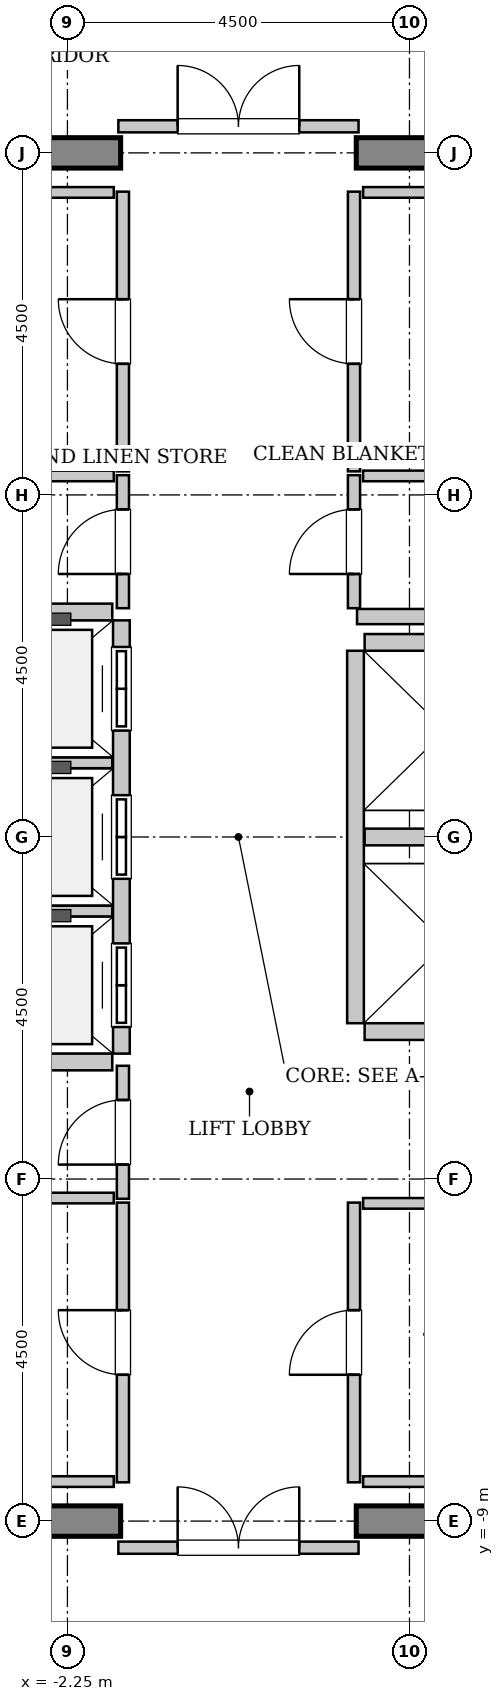
"""IFC4 building model, lengths in metres.
Left out: names, types, materials, properties, quantities, classifications, styles, units other than length and angle.
Written with IfcOpenShell. Run it as: python <this file> out.ifc"""

import sys

from ifc_helpers import new_model, si_unit, direction, frame, frame_2d, origin, place, context, subcontext, project, spatial, rectangle, extrude, source, transform, mapped, element, fill, save


model = new_model("IFC4")
c1 = context("Model", 3, precision=1e-05, world=origin(), true_north=direction((0.0, 1.0)))
c2 = subcontext(c1, "Body", "Model", "MODEL_VIEW")
j1 = project(units=[si_unit("LENGTHUNIT", "METRE"), si_unit("PLANEANGLEUNIT", "RADIAN")], contexts=[c1])
p1 = place(None, origin())
s1 = spatial("IfcSite", under=j1, at=p1, CompositionType="ELEMENT")
p2 = place(p1, origin())
s2 = spatial("IfcBuilding", under=s1, at=p2, CompositionType="ELEMENT")
p3 = place(p2, frame((0.0, 0.0, 330.0)))
s3 = spatial("IfcBuildingStorey", under=s2, at=p3, CompositionType="ELEMENT", Elevation=330.0)
m1 = source(origin(), c2, "Body", "SweptSolid", [
    extrude(rectangle(XDim=9.9, YDim=0.4, at=frame_2d((4.95, 0.0))), origin(), (0.0, 0.0, 1.0), 3.8),
])
for number, where, z_axis, x_axis in (
    (1, (-11.45, 9.0, 0.0), (0.0, 0.0, 1.0), (1.0, 0.0, 0.0)),
    (2, (1.55, 9.0, 0.0), (0.0, 0.0, 1.0), (1.0, 0.0, 0.0)),
    (3, (-11.45, -9.0, 0.0), (0.0, 0.0, 1.0), (1.0, 0.0, 0.0)),
    (4, (1.55, -9.0, 0.0), (0.0, 0.0, 1.0), (1.0, 0.0, 0.0)),
):
    element("IfcWall", number, at=place(p3, frame(where, z_axis=z_axis, x_axis=x_axis)), inside=s3, PredefinedType="SHEAR", context=c2, shape_type="MappedRepresentation", body=[
        mapped(m1, transform((0.0, 0.0, 0.0), x_axis=(1.0, 0.0, 0.0), y_axis=(0.0, 1.0, 0.0), z_axis=(0.0, 0.0, 1.0), scale=1.0)),
    ])
m2 = source(origin(), c2, "Body", "SweptSolid", [
    extrude(rectangle(XDim=5.7, YDim=0.22, at=frame_2d((2.85, 0.0))), origin(), (0.0, 0.0, 1.0), 3.535),
])
p4 = place(p3, frame((-1.54, -2.85, 0.0), z_axis=(0.0, 0.0, 1.0), x_axis=(0.0, 1.0, 0.0)))
e5 = element("IfcWall", 5, at=p4, inside=s3, PredefinedType="SOLIDWALL", context=c2, shape_type="MappedRepresentation", body=[
    mapped(m2, transform((0.0, 0.0, 0.0), x_axis=(1.0, 0.0, 0.0), y_axis=(0.0, 1.0, 0.0), z_axis=(0.0, 0.0, 1.0), scale=1.0)),
])
p5 = place(p4, frame((0.35, 0.0, 0.0)))
e6 = element("IfcOpeningElement", 6, at=p5, cuts=e5, PredefinedType="OPENING", context=c2, shape_type="SweptSolid", body=[
    extrude(rectangle(XDim=1.1, YDim=2.2, at=frame_2d((0.55, 1.1))), frame((0.0, 0.12, 0.0), z_axis=(0.0, -1.0, 0.0), x_axis=(1.0, 0.0, 0.0)), (0.0, 0.0, 1.0), 0.24),
])
p6 = place(p4, frame((2.3, 0.0, 0.0)))
e7 = element("IfcOpeningElement", 7, at=p6, cuts=e5, PredefinedType="OPENING", context=c2, shape_type="SweptSolid", body=[
    extrude(rectangle(XDim=1.1, YDim=2.2, at=frame_2d((0.55, 1.1))), frame((0.0, 0.12, 0.0), z_axis=(0.0, -1.0, 0.0), x_axis=(1.0, 0.0, 0.0)), (0.0, 0.0, 1.0), 0.24),
])
p7 = place(p4, frame((4.25, 0.0, 0.0)))
e8 = element("IfcOpeningElement", 8, at=p7, cuts=e5, PredefinedType="OPENING", context=c2, shape_type="SweptSolid", body=[
    extrude(rectangle(XDim=1.1, YDim=2.2, at=frame_2d((0.55, 1.1))), frame((0.0, 0.12, 0.0), z_axis=(0.0, -1.0, 0.0), x_axis=(1.0, 0.0, 0.0)), (0.0, 0.0, 1.0), 0.24),
])
m3 = source(origin(), c2, "Body", "SweptSolid", [
    extrude(rectangle(XDim=2.13, YDim=0.22, at=frame_2d((1.065, 0.0))), origin(), (0.0, 0.0, 1.0), 3.535),
])
p8 = place(p3, frame((-3.79, -2.96, 0.0), z_axis=(0.0, 0.0, 1.0), x_axis=(1.0, 0.0, 0.0)))
e9 = element("IfcWall", 9, at=p8, inside=s3, PredefinedType="SOLIDWALL", context=c2, shape_type="MappedRepresentation", body=[
    mapped(m3, transform((0.0, 0.0, 0.0), x_axis=(1.0, 0.0, 0.0), y_axis=(0.0, 1.0, 0.0), z_axis=(0.0, 0.0, 1.0), scale=1.0)),
])
m4 = source(origin(), c2, "Body", "SweptSolid", [
    extrude(rectangle(XDim=2.13, YDim=0.14, at=frame_2d((1.065, 0.0))), origin(), (0.0, 0.0, 1.0), 3.535),
])
for number, where, z_axis, x_axis in (
    (10, (-3.79, -0.975, 0.0), (0.0, 0.0, 1.0), (1.0, 0.0, 0.0)),
    (11, (-3.79, 0.975, 0.0), (0.0, 0.0, 1.0), (1.0, 0.0, 0.0)),
):
    element("IfcWall", number, at=place(p3, frame(where, z_axis=z_axis, x_axis=x_axis)), inside=s3, PredefinedType="PARTITIONING", context=c2, shape_type="MappedRepresentation", body=[
        mapped(m4, transform((0.0, 0.0, 0.0), x_axis=(1.0, 0.0, 0.0), y_axis=(0.0, 1.0, 0.0), z_axis=(0.0, 0.0, 1.0), scale=1.0)),
    ])
p9 = place(p3, frame((-1.66, 2.96, 0.0), z_axis=(0.0, 0.0, 1.0), x_axis=(-1.0, 0.0, 0.0)))
e12 = element("IfcWall", 12, at=p9, inside=s3, PredefinedType="SOLIDWALL", context=c2, shape_type="MappedRepresentation", body=[
    mapped(m3, transform((0.0, 0.0, 0.0), x_axis=(1.0, 0.0, 0.0), y_axis=(0.0, 1.0, 0.0), z_axis=(0.0, 0.0, 1.0), scale=1.0)),
])
m5 = source(origin(), c2, "Body", "SweptSolid", [
    extrude(rectangle(XDim=4.9, YDim=0.22, at=frame_2d((2.45, 0.0))), origin(), (0.0, 0.0, 1.0), 3.535),
])
p10 = place(p3, frame((1.54, 2.45, 0.0), z_axis=(0.0, 0.0, 1.0), x_axis=(0.0, -1.0, 0.0)))
e13 = element("IfcWall", 13, at=p10, inside=s3, PredefinedType="SOLIDWALL", context=c2, shape_type="MappedRepresentation", body=[
    mapped(m5, transform((0.0, 0.0, 0.0), x_axis=(1.0, 0.0, 0.0), y_axis=(0.0, 1.0, 0.0), z_axis=(0.0, 0.0, 1.0), scale=1.0)),
])
for number, where, z_axis, x_axis in (
    (14, (1.66, -2.56, 0.0), (0.0, 0.0, 1.0), (1.0, 0.0, 0.0)),
    (15, (1.66, 0.0, 0.0), (0.0, 0.0, 1.0), (1.0, 0.0, 0.0)),
    (16, (3.79, 2.56, 0.0), (0.0, 0.0, 1.0), (-1.0, 0.0, 0.0)),
):
    element("IfcWall", number, at=place(p3, frame(where, z_axis=z_axis, x_axis=x_axis)), inside=s3, PredefinedType="SOLIDWALL", context=c2, shape_type="MappedRepresentation", body=[
        mapped(m3, transform((0.0, 0.0, 0.0), x_axis=(1.0, 0.0, 0.0), y_axis=(0.0, 1.0, 0.0), z_axis=(0.0, 0.0, 1.0), scale=1.0)),
    ])
m6 = source(origin(), c2, "Body", "SweptSolid", [
    extrude(rectangle(XDim=2.52, YDim=0.2, at=frame_2d((1.26, 0.0))), origin(), (0.0, 0.0, 1.0), 3.535),
])
p11 = place(p3, frame((1.56, 2.9, 0.0), z_axis=(0.0, 0.0, 1.0), x_axis=(1.0, 0.0, 0.0)))
e17 = element("IfcWall", 17, at=p11, inside=s3, PredefinedType="PARTITIONING", context=c2, shape_type="MappedRepresentation", body=[
    mapped(m6, transform((0.0, 0.0, 0.0), x_axis=(1.0, 0.0, 0.0), y_axis=(0.0, 1.0, 0.0), z_axis=(0.0, 0.0, 1.0), scale=1.0)),
])
m7 = source(origin(), c2, "Body", "SweptSolid", [
    extrude(rectangle(XDim=3.16, YDim=0.16, at=frame_2d((1.58, 0.0))), origin(), (0.0, 0.0, 1.0), 2.625),
])
p12 = place(p3, frame((-1.58, 9.35, 0.0), z_axis=(0.0, 0.0, 1.0), x_axis=(1.0, 0.0, 0.0)))
e18 = element("IfcWall", 18, at=p12, inside=s3, PredefinedType="PARTITIONING", context=c2, shape_type="MappedRepresentation", body=[
    mapped(m7, transform((0.0, 0.0, 0.0), x_axis=(1.0, 0.0, 0.0), y_axis=(0.0, 1.0, 0.0), z_axis=(0.0, 0.0, 1.0), scale=1.0)),
])
p13 = place(p12, frame((0.78, 0.0, 0.0)))
e19 = element("IfcOpeningElement", 19, at=p13, cuts=e18, PredefinedType="OPENING", context=c2, shape_type="SweptSolid", body=[
    extrude(rectangle(XDim=1.6, YDim=2.3, at=frame_2d((0.8, 1.15))), frame((0.0, 0.09, 0.0), z_axis=(0.0, -1.0, 0.0), x_axis=(1.0, 0.0, 0.0)), (0.0, 0.0, 1.0), 0.18),
])
p14 = place(p3, frame((-1.58, -9.35, 0.0), z_axis=(0.0, 0.0, 1.0), x_axis=(1.0, 0.0, 0.0)))
e20 = element("IfcWall", 20, at=p14, inside=s3, PredefinedType="PARTITIONING", context=c2, shape_type="MappedRepresentation", body=[
    mapped(m7, transform((0.0, 0.0, 0.0), x_axis=(1.0, 0.0, 0.0), y_axis=(0.0, 1.0, 0.0), z_axis=(0.0, 0.0, 1.0), scale=1.0)),
])
p15 = place(p14, frame((0.78, 0.0, 0.0)))
e21 = element("IfcOpeningElement", 21, at=p15, cuts=e20, PredefinedType="OPENING", context=c2, shape_type="SweptSolid", body=[
    extrude(rectangle(XDim=1.6, YDim=2.3, at=frame_2d((0.8, 1.15))), frame((0.0, 0.09, 0.0), z_axis=(0.0, -1.0, 0.0), x_axis=(1.0, 0.0, 0.0)), (0.0, 0.0, 1.0), 0.18),
])
m8 = source(origin(), c2, "Body", "SweptSolid", [
    extrude(rectangle(XDim=1.75, YDim=0.16, at=frame_2d((0.875, 0.0))), origin(), (0.0, 0.0, 1.0), 3.535),
])
p16 = place(p3, frame((-1.52, 3.01, 0.0), z_axis=(0.0, 0.0, 1.0), x_axis=(0.0, 1.0, 0.0)))
e22 = element("IfcWall", 22, at=p16, inside=s3, PredefinedType="PARTITIONING", context=c2, shape_type="MappedRepresentation", body=[
    mapped(m8, transform((0.0, 0.0, 0.0), x_axis=(1.0, 0.0, 0.0), y_axis=(0.0, 1.0, 0.0), z_axis=(0.0, 0.0, 1.0), scale=1.0)),
])
p17 = place(p16, frame((0.45, 0.0, 0.0)))
e23 = element("IfcOpeningElement", 23, at=p17, cuts=e22, PredefinedType="OPENING", context=c2, shape_type="SweptSolid", body=[
    extrude(rectangle(XDim=0.85, YDim=2.1, at=frame_2d((0.425, 1.05))), frame((0.0, 0.09, 0.0), z_axis=(0.0, -1.0, 0.0), x_axis=(1.0, 0.0, 0.0)), (0.0, 0.0, 1.0), 0.18),
])
m9 = source(origin(), c2, "Body", "SweptSolid", [
    extrude(rectangle(XDim=2.95, YDim=0.14, at=frame_2d((1.475, 0.0))), origin(), (0.0, 0.0, 1.0), 3.535),
])
p18 = place(p3, frame((-4.59, 4.75, 0.0), z_axis=(0.0, 0.0, 1.0), x_axis=(1.0, 0.0, 0.0)))
e24 = element("IfcWall", 24, at=p18, inside=s3, PredefinedType="PARTITIONING", context=c2, shape_type="MappedRepresentation", body=[
    mapped(m9, transform((0.0, 0.0, 0.0), x_axis=(1.0, 0.0, 0.0), y_axis=(0.0, 1.0, 0.0), z_axis=(0.0, 0.0, 1.0), scale=1.0)),
])
m10 = source(origin(), c2, "Body", "SweptSolid", [
    extrude(rectangle(XDim=3.68, YDim=0.16, at=frame_2d((1.84, 0.0))), origin(), (0.0, 0.0, 1.0), 3.535),
])
p19 = place(p3, frame((-1.52, 4.81, 0.0), z_axis=(0.0, 0.0, 1.0), x_axis=(0.0, 1.0, 0.0)))
e25 = element("IfcWall", 25, at=p19, inside=s3, PredefinedType="PARTITIONING", context=c2, shape_type="MappedRepresentation", body=[
    mapped(m10, transform((0.0, 0.0, 0.0), x_axis=(1.0, 0.0, 0.0), y_axis=(0.0, 1.0, 0.0), z_axis=(0.0, 0.0, 1.0), scale=1.0)),
])
p20 = place(p19, frame((1.415, 0.0, 0.0)))
e26 = element("IfcOpeningElement", 26, at=p20, cuts=e25, PredefinedType="OPENING", context=c2, shape_type="SweptSolid", body=[
    extrude(rectangle(XDim=0.85, YDim=2.1, at=frame_2d((0.425, 1.05))), frame((0.0, 0.09, 0.0), z_axis=(0.0, -1.0, 0.0), x_axis=(1.0, 0.0, 0.0)), (0.0, 0.0, 1.0), 0.18),
])
m11 = source(origin(), c2, "Body", "SweptSolid", [
    extrude(rectangle(XDim=3.15, YDim=0.14, at=frame_2d((1.575, 0.0))), origin(), (0.0, 0.0, 1.0), 3.535),
])
p21 = place(p3, frame((-4.79, 8.48, 0.0), z_axis=(0.0, 0.0, 1.0), x_axis=(1.0, 0.0, 0.0)))
e27 = element("IfcWall", 27, at=p21, inside=s3, PredefinedType="PARTITIONING", context=c2, shape_type="MappedRepresentation", body=[
    mapped(m11, transform((0.0, 0.0, 0.0), x_axis=(1.0, 0.0, 0.0), y_axis=(0.0, 1.0, 0.0), z_axis=(0.0, 0.0, 1.0), scale=1.0)),
])
p22 = place(p3, frame((1.52, 3.01, 0.0), z_axis=(0.0, 0.0, 1.0), x_axis=(0.0, 1.0, 0.0)))
e28 = element("IfcWall", 28, at=p22, inside=s3, PredefinedType="PARTITIONING", context=c2, shape_type="MappedRepresentation", body=[
    mapped(m8, transform((0.0, 0.0, 0.0), x_axis=(1.0, 0.0, 0.0), y_axis=(0.0, 1.0, 0.0), z_axis=(0.0, 0.0, 1.0), scale=1.0)),
])
p23 = place(p22, frame((0.45, 0.0, 0.0)))
e29 = element("IfcOpeningElement", 29, at=p23, cuts=e28, PredefinedType="OPENING", context=c2, shape_type="SweptSolid", body=[
    extrude(rectangle(XDim=0.85, YDim=2.1, at=frame_2d((0.425, 1.05))), frame((0.0, 0.09, 0.0), z_axis=(0.0, -1.0, 0.0), x_axis=(1.0, 0.0, 0.0)), (0.0, 0.0, 1.0), 0.18),
])
p24 = place(p3, frame((1.64, 4.75, 0.0), z_axis=(0.0, 0.0, 1.0), x_axis=(1.0, 0.0, 0.0)))
e30 = element("IfcWall", 30, at=p24, inside=s3, PredefinedType="PARTITIONING", context=c2, shape_type="MappedRepresentation", body=[
    mapped(m11, transform((0.0, 0.0, 0.0), x_axis=(1.0, 0.0, 0.0), y_axis=(0.0, 1.0, 0.0), z_axis=(0.0, 0.0, 1.0), scale=1.0)),
])
p25 = place(p3, frame((1.52, 4.81, 0.0), z_axis=(0.0, 0.0, 1.0), x_axis=(0.0, 1.0, 0.0)))
e31 = element("IfcWall", 31, at=p25, inside=s3, PredefinedType="PARTITIONING", context=c2, shape_type="MappedRepresentation", body=[
    mapped(m10, transform((0.0, 0.0, 0.0), x_axis=(1.0, 0.0, 0.0), y_axis=(0.0, 1.0, 0.0), z_axis=(0.0, 0.0, 1.0), scale=1.0)),
])
p26 = place(p25, frame((1.415, 0.0, 0.0)))
e32 = element("IfcOpeningElement", 32, at=p26, cuts=e31, PredefinedType="OPENING", context=c2, shape_type="SweptSolid", body=[
    extrude(rectangle(XDim=0.85, YDim=2.1, at=frame_2d((0.425, 1.05))), frame((0.0, 0.09, 0.0), z_axis=(0.0, -1.0, 0.0), x_axis=(1.0, 0.0, 0.0)), (0.0, 0.0, 1.0), 0.18),
])
p27 = place(p3, frame((1.64, 8.48, 0.0), z_axis=(0.0, 0.0, 1.0), x_axis=(1.0, 0.0, 0.0)))
e33 = element("IfcWall", 33, at=p27, inside=s3, PredefinedType="PARTITIONING", context=c2, shape_type="MappedRepresentation", body=[
    mapped(m11, transform((0.0, 0.0, 0.0), x_axis=(1.0, 0.0, 0.0), y_axis=(0.0, 1.0, 0.0), z_axis=(0.0, 0.0, 1.0), scale=1.0)),
])
p28 = place(p3, frame((-1.52, -4.76, 0.0), z_axis=(0.0, 0.0, 1.0), x_axis=(0.0, 1.0, 0.0)))
e34 = element("IfcWall", 34, at=p28, inside=s3, PredefinedType="PARTITIONING", context=c2, shape_type="MappedRepresentation", body=[
    mapped(m8, transform((0.0, 0.0, 0.0), x_axis=(1.0, 0.0, 0.0), y_axis=(0.0, 1.0, 0.0), z_axis=(0.0, 0.0, 1.0), scale=1.0)),
])
p29 = place(p28, frame((0.45, 0.0, 0.0)))
e35 = element("IfcOpeningElement", 35, at=p29, cuts=e34, PredefinedType="OPENING", context=c2, shape_type="SweptSolid", body=[
    extrude(rectangle(XDim=0.85, YDim=2.1, at=frame_2d((0.425, 1.05))), frame((0.0, 0.09, 0.0), z_axis=(0.0, -1.0, 0.0), x_axis=(1.0, 0.0, 0.0)), (0.0, 0.0, 1.0), 0.18),
])
p30 = place(p3, frame((-4.79, -4.75, 0.0), z_axis=(0.0, 0.0, 1.0), x_axis=(1.0, 0.0, 0.0)))
e36 = element("IfcWall", 36, at=p30, inside=s3, PredefinedType="PARTITIONING", context=c2, shape_type="MappedRepresentation", body=[
    mapped(m11, transform((0.0, 0.0, 0.0), x_axis=(1.0, 0.0, 0.0), y_axis=(0.0, 1.0, 0.0), z_axis=(0.0, 0.0, 1.0), scale=1.0)),
])
p31 = place(p3, frame((-1.52, -8.49, 0.0), z_axis=(0.0, 0.0, 1.0), x_axis=(0.0, 1.0, 0.0)))
e37 = element("IfcWall", 37, at=p31, inside=s3, PredefinedType="PARTITIONING", context=c2, shape_type="MappedRepresentation", body=[
    mapped(m10, transform((0.0, 0.0, 0.0), x_axis=(1.0, 0.0, 0.0), y_axis=(0.0, 1.0, 0.0), z_axis=(0.0, 0.0, 1.0), scale=1.0)),
])
p32 = place(p31, frame((1.415, 0.0, 0.0)))
e38 = element("IfcOpeningElement", 38, at=p32, cuts=e37, PredefinedType="OPENING", context=c2, shape_type="SweptSolid", body=[
    extrude(rectangle(XDim=0.85, YDim=2.1, at=frame_2d((0.425, 1.05))), frame((0.0, 0.09, 0.0), z_axis=(0.0, -1.0, 0.0), x_axis=(1.0, 0.0, 0.0)), (0.0, 0.0, 1.0), 0.18),
])
m12 = source(origin(), c2, "Body", "SweptSolid", [
    extrude(rectangle(XDim=3.03, YDim=0.14, at=frame_2d((1.515, 0.0))), origin(), (0.0, 0.0, 1.0), 3.535),
])
p33 = place(p3, frame((-4.67, -8.48, 0.0), z_axis=(0.0, 0.0, 1.0), x_axis=(1.0, 0.0, 0.0)))
e39 = element("IfcWall", 39, at=p33, inside=s3, PredefinedType="PARTITIONING", context=c2, shape_type="MappedRepresentation", body=[
    mapped(m12, transform((0.0, 0.0, 0.0), x_axis=(1.0, 0.0, 0.0), y_axis=(0.0, 1.0, 0.0), z_axis=(0.0, 0.0, 1.0), scale=1.0)),
])
p34 = place(p3, frame((1.52, -8.49, 0.0), z_axis=(0.0, 0.0, 1.0), x_axis=(0.0, 1.0, 0.0)))
e40 = element("IfcWall", 40, at=p34, inside=s3, PredefinedType="PARTITIONING", context=c2, shape_type="MappedRepresentation", body=[
    mapped(m10, transform((0.0, 0.0, 0.0), x_axis=(1.0, 0.0, 0.0), y_axis=(0.0, 1.0, 0.0), z_axis=(0.0, 0.0, 1.0), scale=1.0)),
])
p35 = place(p34, frame((1.415, 0.0, 0.0)))
e41 = element("IfcOpeningElement", 41, at=p35, cuts=e40, PredefinedType="OPENING", context=c2, shape_type="SweptSolid", body=[
    extrude(rectangle(XDim=0.85, YDim=2.1, at=frame_2d((0.425, 1.05))), frame((0.0, 0.09, 0.0), z_axis=(0.0, -1.0, 0.0), x_axis=(1.0, 0.0, 0.0)), (0.0, 0.0, 1.0), 0.18),
])
p36 = place(p3, frame((1.64, -4.82, 0.0), z_axis=(0.0, 0.0, 1.0), x_axis=(1.0, 0.0, 0.0)))
e42 = element("IfcWall", 42, at=p36, inside=s3, PredefinedType="PARTITIONING", context=c2, shape_type="MappedRepresentation", body=[
    mapped(m9, transform((0.0, 0.0, 0.0), x_axis=(1.0, 0.0, 0.0), y_axis=(0.0, 1.0, 0.0), z_axis=(0.0, 0.0, 1.0), scale=1.0)),
])
p37 = place(p3, frame((1.64, -8.48, 0.0), z_axis=(0.0, 0.0, 1.0), x_axis=(1.0, 0.0, 0.0)))
e43 = element("IfcWall", 43, at=p37, inside=s3, PredefinedType="PARTITIONING", context=c2, shape_type="MappedRepresentation", body=[
    mapped(m11, transform((0.0, 0.0, 0.0), x_axis=(1.0, 0.0, 0.0), y_axis=(0.0, 1.0, 0.0), z_axis=(0.0, 0.0, 1.0), scale=1.0)),
])
m13 = source(origin(), c2, "Body", "SweptSolid", [
    extrude(rectangle(XDim=1.1, YDim=2.2, at=frame_2d((0.55, 1.1))), frame((0.0, 0.025, 0.0), z_axis=(0.0, -1.0, 0.0), x_axis=(1.0, 0.0, 0.0)), (0.0, 0.0, 1.0), 0.05),
])
p38 = place(p5, origin())
e44 = element("IfcDoor", 44, at=p38, inside=s3, OperationType="DOUBLE_DOOR_SLIDING", PredefinedType="DOOR", context=c2, shape_type="MappedRepresentation", body=[
    mapped(m13, transform((0.0, 0.0, 0.0), x_axis=(1.0, 0.0, 0.0), y_axis=(0.0, 1.0, 0.0), z_axis=(0.0, 0.0, 1.0), scale=1.0)),
])
fill(e6, e44)
p39 = place(p6, origin())
e45 = element("IfcDoor", 45, at=p39, inside=s3, OperationType="DOUBLE_DOOR_SLIDING", PredefinedType="DOOR", context=c2, shape_type="MappedRepresentation", body=[
    mapped(m13, transform((0.0, 0.0, 0.0), x_axis=(1.0, 0.0, 0.0), y_axis=(0.0, 1.0, 0.0), z_axis=(0.0, 0.0, 1.0), scale=1.0)),
])
fill(e7, e45)
p40 = place(p7, origin())
e46 = element("IfcDoor", 46, at=p40, inside=s3, OperationType="DOUBLE_DOOR_SLIDING", PredefinedType="DOOR", context=c2, shape_type="MappedRepresentation", body=[
    mapped(m13, transform((0.0, 0.0, 0.0), x_axis=(1.0, 0.0, 0.0), y_axis=(0.0, 1.0, 0.0), z_axis=(0.0, 0.0, 1.0), scale=1.0)),
])
fill(e8, e46)
m14 = source(origin(), c2, "Body", "SweptSolid", [
    extrude(rectangle(XDim=1.6, YDim=2.3, at=frame_2d((0.8, 1.15))), frame((0.0, 0.025, 0.0), z_axis=(0.0, -1.0, 0.0), x_axis=(1.0, 0.0, 0.0)), (0.0, 0.0, 1.0), 0.05),
])
p41 = place(p13, origin())
e47 = element("IfcDoor", 47, at=p41, inside=s3, OperationType="DOUBLE_DOOR_SINGLE_SWING", PredefinedType="DOOR", context=c2, shape_type="MappedRepresentation", body=[
    mapped(m14, transform((0.0, 0.0, 0.0), x_axis=(1.0, 0.0, 0.0), y_axis=(0.0, 1.0, 0.0), z_axis=(0.0, 0.0, 1.0), scale=1.0)),
])
fill(e19, e47)
p42 = place(p15, origin())
e48 = element("IfcDoor", 48, at=p42, inside=s3, OperationType="DOUBLE_DOOR_SINGLE_SWING", PredefinedType="DOOR", context=c2, shape_type="MappedRepresentation", body=[
    mapped(m14, transform((0.0, 0.0, 0.0), x_axis=(1.0, 0.0, 0.0), y_axis=(0.0, 1.0, 0.0), z_axis=(0.0, 0.0, 1.0), scale=1.0)),
])
fill(e21, e48)
m15 = source(origin(), c2, "Body", "SweptSolid", [
    extrude(rectangle(XDim=0.85, YDim=2.1, at=frame_2d((0.425, 1.05))), frame((0.0, 0.025, 0.0), z_axis=(0.0, -1.0, 0.0), x_axis=(1.0, 0.0, 0.0)), (0.0, 0.0, 1.0), 0.05),
])
p43 = place(p17, origin())
e49 = element("IfcDoor", 49, at=p43, inside=s3, OperationType="SINGLE_SWING_LEFT", PredefinedType="DOOR", context=c2, shape_type="MappedRepresentation", body=[
    mapped(m15, transform((0.0, 0.0, 0.0), x_axis=(1.0, 0.0, 0.0), y_axis=(0.0, 1.0, 0.0), z_axis=(0.0, 0.0, 1.0), scale=1.0)),
])
fill(e23, e49)
p44 = place(p20, origin())
e50 = element("IfcDoor", 50, at=p44, inside=s3, OperationType="SINGLE_SWING_RIGHT", PredefinedType="DOOR", context=c2, shape_type="MappedRepresentation", body=[
    mapped(m15, transform((0.0, 0.0, 0.0), x_axis=(1.0, 0.0, 0.0), y_axis=(0.0, 1.0, 0.0), z_axis=(0.0, 0.0, 1.0), scale=1.0)),
])
fill(e26, e50)
p45 = place(p23, origin())
e51 = element("IfcDoor", 51, at=p45, inside=s3, OperationType="SINGLE_SWING_LEFT", PredefinedType="DOOR", context=c2, shape_type="MappedRepresentation", body=[
    mapped(m15, transform((0.0, 0.0, 0.0), x_axis=(1.0, 0.0, 0.0), y_axis=(0.0, 1.0, 0.0), z_axis=(0.0, 0.0, 1.0), scale=1.0)),
])
fill(e29, e51)
p46 = place(p26, origin())
e52 = element("IfcDoor", 52, at=p46, inside=s3, OperationType="SINGLE_SWING_RIGHT", PredefinedType="DOOR", context=c2, shape_type="MappedRepresentation", body=[
    mapped(m15, transform((0.0, 0.0, 0.0), x_axis=(1.0, 0.0, 0.0), y_axis=(0.0, 1.0, 0.0), z_axis=(0.0, 0.0, 1.0), scale=1.0)),
])
fill(e32, e52)
p47 = place(p29, origin())
e53 = element("IfcDoor", 53, at=p47, inside=s3, OperationType="SINGLE_SWING_LEFT", PredefinedType="DOOR", context=c2, shape_type="MappedRepresentation", body=[
    mapped(m15, transform((0.0, 0.0, 0.0), x_axis=(1.0, 0.0, 0.0), y_axis=(0.0, 1.0, 0.0), z_axis=(0.0, 0.0, 1.0), scale=1.0)),
])
fill(e35, e53)
p48 = place(p32, origin())
e54 = element("IfcDoor", 54, at=p48, inside=s3, OperationType="SINGLE_SWING_RIGHT", PredefinedType="DOOR", context=c2, shape_type="MappedRepresentation", body=[
    mapped(m15, transform((0.0, 0.0, 0.0), x_axis=(1.0, 0.0, 0.0), y_axis=(0.0, 1.0, 0.0), z_axis=(0.0, 0.0, 1.0), scale=1.0)),
])
fill(e38, e54)
p49 = place(p35, origin())
e55 = element("IfcDoor", 55, at=p49, inside=s3, OperationType="SINGLE_SWING_LEFT", PredefinedType="DOOR", context=c2, shape_type="MappedRepresentation", body=[
    mapped(m15, transform((0.0, 0.0, 0.0), x_axis=(1.0, 0.0, 0.0), y_axis=(0.0, 1.0, 0.0), z_axis=(0.0, 0.0, 1.0), scale=1.0)),
])
fill(e41, e55)
save(model, sys.argv[1])
